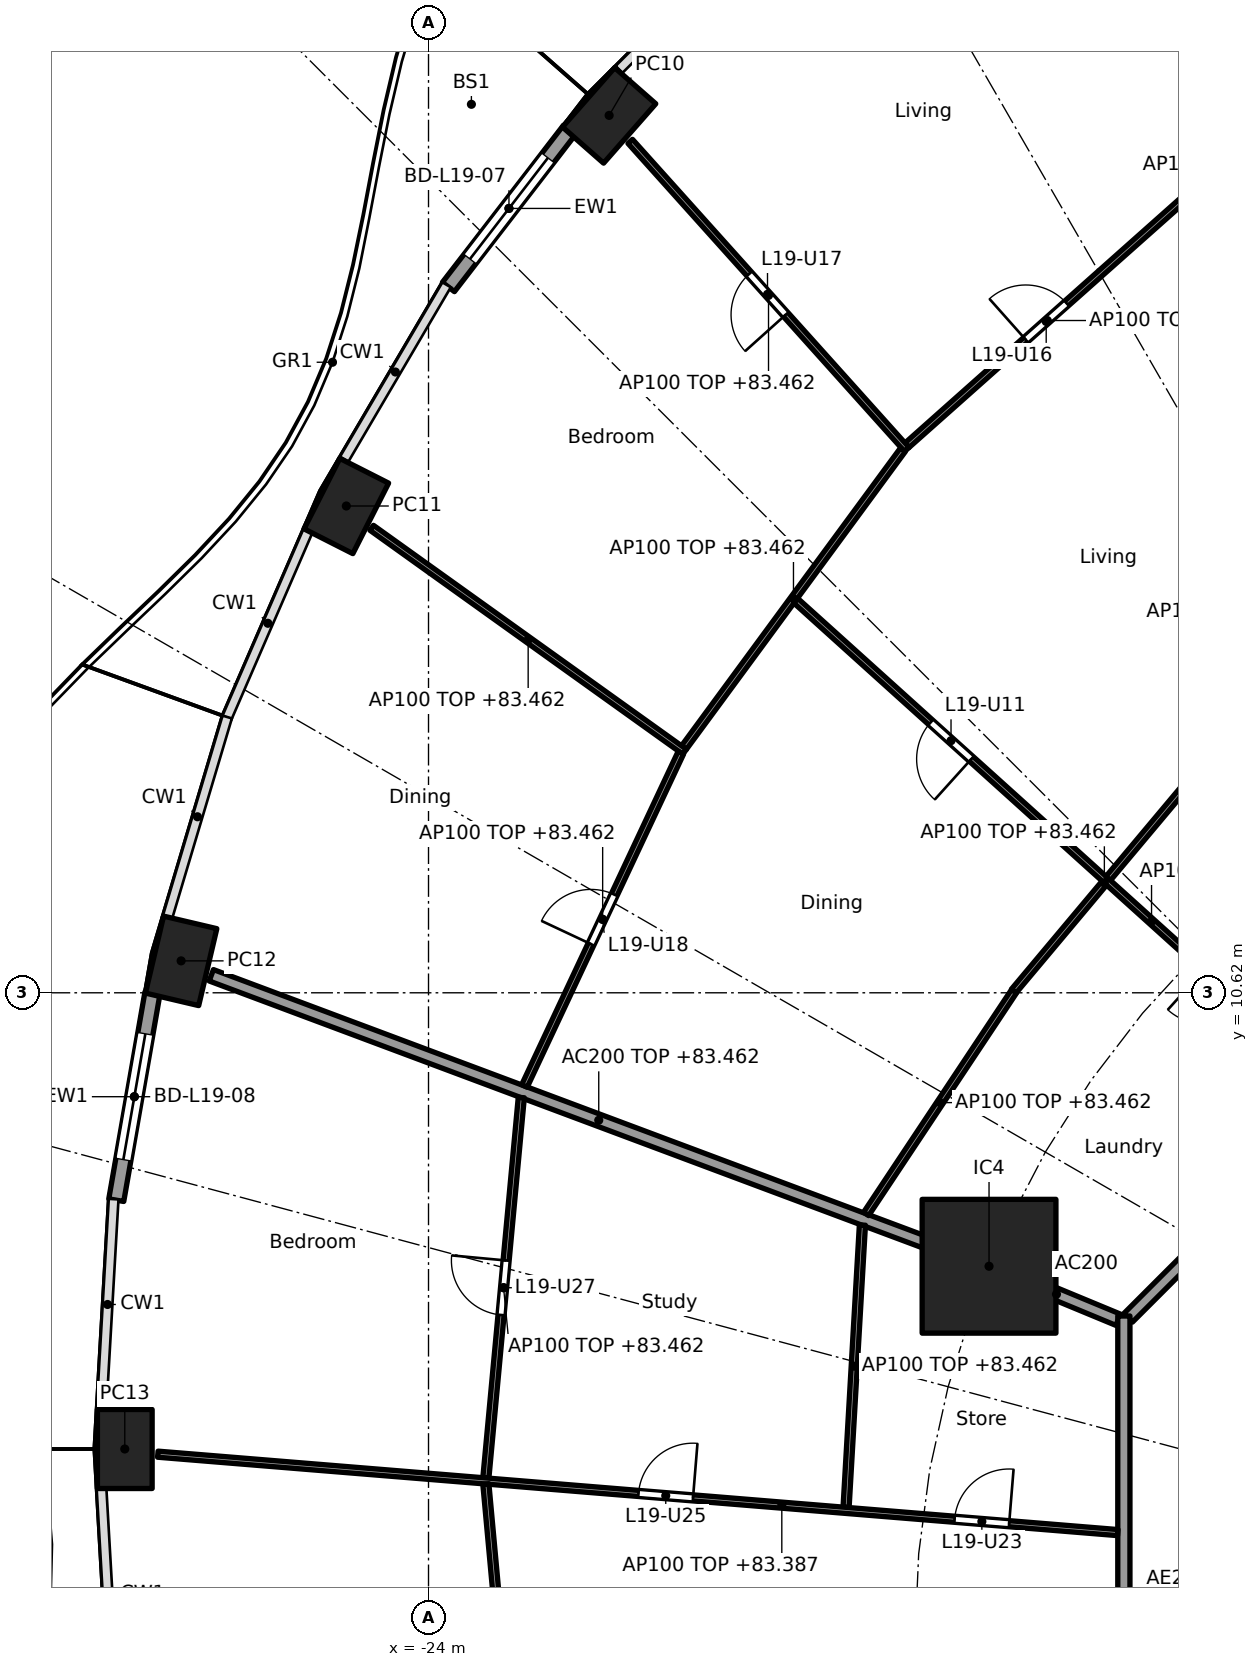
"""IFC4 building model, lengths in metres.
Left out: names, types, materials, properties, quantities, classifications, styles, units other than length and angle.
Written with IfcOpenShell. Run it as: python <this file> out.ifc"""

import sys

from ifc_helpers import new_model, si_unit, direction, frame, frame_2d, origin, origin_2d, place, context, subcontext, project, spatial, rectangle, hollow_rectangle, extrude, element, fill, save


model = new_model("IFC4")
c1 = context("Model", 3, precision=1e-05, world=origin(), true_north=direction((0.0, 1.0)))
c2 = subcontext(c1, "Body", "Model", "MODEL_VIEW")
j1 = project(units=[si_unit("LENGTHUNIT", "METRE"), si_unit("PLANEANGLEUNIT", "RADIAN")], contexts=[c1])
p1 = place(None, origin())
s1 = spatial("IfcSite", under=j1, at=p1, CompositionType="ELEMENT")
p2 = place(p1, origin())
s2 = spatial("IfcBuilding", under=s1, at=p2, CompositionType="ELEMENT")
p3 = place(p2, frame((0.0, 0.0, 80.7)))
s3 = spatial("IfcBuildingStorey", under=s2, at=p3, CompositionType="ELEMENT", Elevation=80.7)
for number, where, z_axis, x_axis in (
    (1, (-21.03, 25.049, 0.0), (0.0, 0.0, 1.0), (-0.66, -0.751, 0.0)),
    (2, (-25.352, 18.625, 0.0), (0.0, 0.0, 1.0), (-0.452, -0.892, 0.0)),
    (3, (-28.068, 11.145, 0.0), (0.0, 0.0, 1.0), (-0.229, -0.973, 0.0)),
    (4, (-28.995, 3.118, 0.0), (0.0, 0.0, 1.0), (0.0, -1.0, 0.0)),
):
    element("IfcColumn", number, at=place(p3, frame(where, z_axis=z_axis, x_axis=x_axis)), inside=s3, PredefinedType="COLUMN", context=c2, shape_type="SweptSolid", body=[
        extrude(hollow_rectangle(XDim=1.3, YDim=0.9, WallThickness=0.045, at=origin_2d()), origin(), (0.0, 0.0, 1.0), 3.7),
    ])
p4 = place(p3, frame((-14.782, 6.123, 0.0), z_axis=(0.0, 0.0, 1.0), x_axis=(1.0, 0.0, 0.0)))
e5 = element("IfcColumn", 5, at=p4, inside=s3, PredefinedType="COLUMN", context=c2, shape_type="SweptSolid", body=[
    extrude(rectangle(XDim=2.2, YDim=2.2, at=origin_2d()), origin(), (0.0, 0.0, 1.0), 3.7),
])
p5 = place(p3, frame((-23.673, 22.227, 0.0), z_axis=(0.0, 0.0, 1.0), x_axis=(0.61041202934, 0.792084057684, 0.0)))
e6 = element("IfcWall", 6, at=p5, inside=s3, PredefinedType="SOLIDWALL", context=c2, shape_type="SweptSolid", body=[
    extrude(rectangle(XDim=3.263, YDim=0.25, at=frame_2d((1.631, 0.0))), origin(), (0.0, 0.0, 1.0), 3.44),
])
p6 = place(p5, frame((0.582, 0.0, 0.0)))
e7 = element("IfcOpeningElement", 7, at=p6, cuts=e6, PredefinedType="OPENING", context=c2, shape_type="SweptSolid", body=[
    extrude(rectangle(XDim=2.1, YDim=2.4, at=frame_2d((1.05, 1.2))), frame((0.0, 0.135, 0.0), z_axis=(0.0, -1.0, 0.0), x_axis=(1.0, 0.0, 0.0)), (0.0, 0.0, 1.0), 0.27),
])
p7 = place(p3, frame((-29.135, 7.21, 0.0), z_axis=(0.0, 0.0, 1.0), x_axis=(0.17223289558, 0.985056257114, 0.0)))
e8 = element("IfcWall", 8, at=p7, inside=s3, PredefinedType="SOLIDWALL", context=c2, shape_type="SweptSolid", body=[
    extrude(rectangle(XDim=3.454, YDim=0.25, at=frame_2d((1.727, 0.0))), origin(), (0.0, 0.0, 1.0), 3.44),
])
p8 = place(p7, frame((0.677, 0.0, 0.0)))
e9 = element("IfcOpeningElement", 9, at=p8, cuts=e8, PredefinedType="OPENING", context=c2, shape_type="SweptSolid", body=[
    extrude(rectangle(XDim=2.1, YDim=2.4, at=frame_2d((1.05, 1.2))), frame((0.0, 0.135, 0.0), z_axis=(0.0, -1.0, 0.0), x_axis=(1.0, 0.0, 0.0)), (0.0, 0.0, 1.0), 0.27),
])
p9 = place(p3, frame((-12.657, 5.243, 0.0), z_axis=(0.0, 0.0, 1.0), x_axis=(-0.923843626288, 0.382770106157, 0.0)))
e10 = element("IfcWall", 10, at=p9, inside=s3, PredefinedType="PARTITIONING", context=c2, shape_type="SweptSolid", body=[
    extrude(rectangle(XDim=2.199, YDim=0.2, at=frame_2d((1.1, 0.0))), origin(), (0.0, 0.0, 1.0), 3.44),
])
p10 = place(p3, frame((-14.829, 6.14, 0.0), z_axis=(0.0, 0.0, 1.0), x_axis=(-0.936597324342, 0.35040755134, 0.0)))
e11 = element("IfcWall", 11, at=p10, inside=s3, PredefinedType="PARTITIONING", context=c2, shape_type="SweptSolid", body=[
    extrude(rectangle(XDim=13.606, YDim=0.2, at=frame_2d((6.803, 0.0))), origin(), (0.0, 0.0, 1.0), 2.762),
])
p11 = place(p3, frame((-5.275, 12.494, 0.0), z_axis=(0.0, 0.0, 1.0), x_axis=(-0.707106781187, -0.707106781187, 0.0)))
e12 = element("IfcWall", 12, at=p11, inside=s3, PredefinedType="PARTITIONING", context=c2, shape_type="SweptSolid", body=[
    extrude(rectangle(XDim=10.209, YDim=0.2, at=frame_2d((5.104, 0.0))), origin(), (0.0, 0.0, 1.0), 3.44),
])
p12 = place(p3, frame((-12.565, 5.304, 0.0), z_axis=(0.0, 0.0, 1.0), x_axis=(0.0, -1.0, 0.0)))
e13 = element("IfcWall", 13, at=p12, inside=s3, PredefinedType="PARTITIONING", context=c2, shape_type="SweptSolid", body=[
    extrude(rectangle(XDim=10.409, YDim=0.2, at=frame_2d((5.205, 0.0))), origin(), (0.0, 0.0, 1.0), 3.44),
])
p13 = place(p12, frame((4.804, 0.0, 0.0)))
e14 = element("IfcOpeningElement", 14, at=p13, cuts=e13, PredefinedType="OPENING", context=c2, shape_type="SweptSolid", body=[
    extrude(rectangle(XDim=1.0, YDim=2.1, at=frame_2d((0.5, 1.05))), frame((0.0, 0.11, 0.0), z_axis=(0.0, -1.0, 0.0), x_axis=(1.0, 0.0, 0.0)), (0.0, 0.0, 1.0), 0.22),
])
p14 = place(p3, frame((-6.072, 17.915, 0.0), z_axis=(0.0, 0.0, 1.0), x_axis=(-0.404139814253, 0.914697223422, 0.0)))
e15 = element("IfcWall", 15, at=p14, inside=s3, PredefinedType="PARTITIONING", context=c2, shape_type="SweptSolid", body=[
    extrude(rectangle(XDim=15.614, YDim=0.1, at=frame_2d((7.807, 0.0))), origin(), (0.0, 0.0, 1.0), 2.837),
])
p15 = place(p14, frame((3.226, 0.0, 0.0)))
e16 = element("IfcOpeningElement", 16, at=p15, cuts=e15, PredefinedType="OPENING", context=c2, shape_type="SweptSolid", body=[
    extrude(rectangle(XDim=0.9, YDim=2.1, at=frame_2d((0.45, 1.05))), frame((0.0, 0.06, 0.0), z_axis=(0.0, -1.0, 0.0), x_axis=(1.0, 0.0, 0.0)), (0.0, 0.0, 1.0), 0.12),
])
p16 = place(p3, frame((-11.516, 23.726, 0.0), z_axis=(0.0, 0.0, 1.0), x_axis=(-0.747428955243, -0.664341747043, 0.0)))
e17 = element("IfcWall", 17, at=p16, inside=s3, PredefinedType="PARTITIONING", context=c2, shape_type="SweptSolid", body=[
    extrude(rectangle(XDim=6.174, YDim=0.1, at=frame_2d((3.087, 0.0))), origin(), (0.0, 0.0, 1.0), 2.762),
])
p17 = place(p16, frame((2.662, 0.0, 0.0)))
e18 = element("IfcOpeningElement", 18, at=p17, cuts=e17, PredefinedType="OPENING", context=c2, shape_type="SweptSolid", body=[
    extrude(rectangle(XDim=0.9, YDim=2.1, at=frame_2d((0.45, 1.05))), frame((0.0, 0.06, 0.0), z_axis=(0.0, -1.0, 0.0), x_axis=(1.0, 0.0, 0.0)), (0.0, 0.0, 1.0), 0.12),
])
p18 = place(p3, frame((-11.396, 14.202, 0.0), z_axis=(0.0, 0.0, 1.0), x_axis=(-0.642475660273, -0.766306091557, 0.0)))
e19 = element("IfcWall", 19, at=p18, inside=s3, PredefinedType="PARTITIONING", context=c2, shape_type="SweptSolid", body=[
    extrude(rectangle(XDim=4.637, YDim=0.1, at=frame_2d((2.319, 0.0))), origin(), (0.0, 0.0, 1.0), 2.762),
])
p19 = place(p3, frame((-16.134, 19.554, 0.0), z_axis=(0.0, 0.0, 1.0), x_axis=(-0.667985610263, 0.74417418961, 0.0)))
e20 = element("IfcWall", 20, at=p19, inside=s3, PredefinedType="PARTITIONING", context=c2, shape_type="SweptSolid", body=[
    extrude(rectangle(XDim=6.809, YDim=0.1, at=frame_2d((3.405, 0.0))), origin(), (0.0, 0.0, 1.0), 2.762),
])
p20 = place(p19, frame((2.98, 0.0, 0.0)))
e21 = element("IfcOpeningElement", 21, at=p20, cuts=e20, PredefinedType="OPENING", context=c2, shape_type="SweptSolid", body=[
    extrude(rectangle(XDim=0.9, YDim=2.1, at=frame_2d((0.45, 1.05))), frame((0.0, 0.06, 0.0), z_axis=(0.0, -1.0, 0.0), x_axis=(1.0, 0.0, 0.0)), (0.0, 0.0, 1.0), 0.12),
])
p21 = place(p3, frame((-16.197, 19.551, 0.0), z_axis=(0.0, 0.0, 1.0), x_axis=(-0.592391983588, -0.80564988536, 0.0)))
e22 = element("IfcWall", 22, at=p21, inside=s3, PredefinedType="PARTITIONING", context=c2, shape_type="SweptSolid", body=[
    extrude(rectangle(XDim=6.08, YDim=0.1, at=frame_2d((3.04, 0.0))), origin(), (0.0, 0.0, 1.0), 2.762),
])
p22 = place(p3, frame((-8.959, 8.952, 0.0), z_axis=(0.0, 0.0, 1.0), x_axis=(-0.742679904999, 0.669646592398, 0.0)))
e23 = element("IfcWall", 23, at=p22, inside=s3, PredefinedType="PARTITIONING", context=c2, shape_type="SweptSolid", body=[
    extrude(rectangle(XDim=12.121, YDim=0.1, at=frame_2d((6.061, 0.0))), origin(), (0.0, 0.0, 1.0), 2.687),
])
p23 = place(p22, frame((2.172, 0.0, 0.0)))
e24 = element("IfcOpeningElement", 24, at=p23, cuts=e23, PredefinedType="OPENING", context=c2, shape_type="SweptSolid", body=[
    extrude(rectangle(XDim=0.9, YDim=2.1, at=frame_2d((0.45, 1.05))), frame((0.0, 0.06, 0.0), z_axis=(0.0, -1.0, 0.0), x_axis=(1.0, 0.0, 0.0)), (0.0, 0.0, 1.0), 0.12),
])
p24 = place(p22, frame((8.233, 0.0, 0.0)))
e25 = element("IfcOpeningElement", 25, at=p24, cuts=e23, PredefinedType="OPENING", context=c2, shape_type="SweptSolid", body=[
    extrude(rectangle(XDim=0.9, YDim=2.1, at=frame_2d((0.45, 1.05))), frame((0.0, 0.06, 0.0), z_axis=(0.0, -1.0, 0.0), x_axis=(1.0, 0.0, 0.0)), (0.0, 0.0, 1.0), 0.12),
])
p25 = place(p3, frame((-14.371, 10.645, 0.0), z_axis=(0.0, 0.0, 1.0), x_axis=(-0.553341009285, -0.832954817168, 0.0)))
e26 = element("IfcWall", 26, at=p25, inside=s3, PredefinedType="PARTITIONING", context=c2, shape_type="SweptSolid", body=[
    extrude(rectangle(XDim=4.396, YDim=0.1, at=frame_2d((2.198, 0.0))), origin(), (0.0, 0.0, 1.0), 2.762),
])
p26 = place(p3, frame((-19.788, 14.583, 0.0), z_axis=(0.0, 0.0, 1.0), x_axis=(-0.813175286569, 0.58201885993, 0.0)))
e27 = element("IfcWall", 27, at=p26, inside=s3, PredefinedType="PARTITIONING", context=c2, shape_type="SweptSolid", body=[
    extrude(rectangle(XDim=6.329, YDim=0.1, at=frame_2d((3.164, 0.0))), origin(), (0.0, 0.0, 1.0), 2.762),
])
p27 = place(p3, frame((-19.85, 14.567, 0.0), z_axis=(0.0, 0.0, 1.0), x_axis=(-0.424942210745, -0.905220480064, 0.0)))
e28 = element("IfcWall", 28, at=p27, inside=s3, PredefinedType="PARTITIONING", context=c2, shape_type="SweptSolid", body=[
    extrude(rectangle(XDim=6.053, YDim=0.1, at=frame_2d((3.027, 0.0))), origin(), (0.0, 0.0, 1.0), 2.762),
])
p28 = place(p27, frame((2.577, 0.0, 0.0)))
e29 = element("IfcOpeningElement", 29, at=p28, cuts=e28, PredefinedType="OPENING", context=c2, shape_type="SweptSolid", body=[
    extrude(rectangle(XDim=0.9, YDim=2.1, at=frame_2d((0.45, 1.05))), frame((0.0, 0.06, 0.0), z_axis=(0.0, -1.0, 0.0), x_axis=(1.0, 0.0, 0.0)), (0.0, 0.0, 1.0), 0.12),
])
p29 = place(p3, frame((-16.865, 6.8, 0.0), z_axis=(0.0, 0.0, 1.0), x_axis=(-0.057758567218, -0.998330580476, 0.0)))
e30 = element("IfcWall", 30, at=p29, inside=s3, PredefinedType="PARTITIONING", context=c2, shape_type="SweptSolid", body=[
    extrude(rectangle(XDim=4.65, YDim=0.1, at=frame_2d((2.325, 0.0))), origin(), (0.0, 0.0, 1.0), 2.762),
])
p30 = place(p3, frame((-22.474, 8.898, 0.0), z_axis=(0.0, 0.0, 1.0), x_axis=(-0.092756864489, -0.995688788774, 0.0)))
e31 = element("IfcWall", 31, at=p30, inside=s3, PredefinedType="PARTITIONING", context=c2, shape_type="SweptSolid", body=[
    extrude(rectangle(XDim=6.283, YDim=0.1, at=frame_2d((3.141, 0.0))), origin(), (0.0, 0.0, 1.0), 2.762),
])
p31 = place(p30, frame((2.691, 0.0, 0.0)))
e32 = element("IfcOpeningElement", 32, at=p31, cuts=e31, PredefinedType="OPENING", context=c2, shape_type="SweptSolid", body=[
    extrude(rectangle(XDim=0.9, YDim=2.1, at=frame_2d((0.45, 1.05))), frame((0.0, 0.06, 0.0), z_axis=(0.0, -1.0, 0.0), x_axis=(1.0, 0.0, 0.0)), (0.0, 0.0, 1.0), 0.12),
])
p32 = place(p3, frame((-12.665, 1.743, 0.0), z_axis=(0.0, 0.0, 1.0), x_axis=(-0.996680482238, 0.081412630013, 0.0)))
e33 = element("IfcWall", 33, at=p32, inside=s3, PredefinedType="PARTITIONING", context=c2, shape_type="SweptSolid", body=[
    extrude(rectangle(XDim=15.84, YDim=0.1, at=frame_2d((7.92, 0.0))), origin(), (0.0, 0.0, 1.0), 2.687),
])
p33 = place(p32, frame((1.793, 0.0, 0.0)))
e34 = element("IfcOpeningElement", 34, at=p33, cuts=e33, PredefinedType="OPENING", context=c2, shape_type="SweptSolid", body=[
    extrude(rectangle(XDim=0.9, YDim=2.1, at=frame_2d((0.45, 1.05))), frame((0.0, 0.06, 0.0), z_axis=(0.0, -1.0, 0.0), x_axis=(1.0, 0.0, 0.0)), (0.0, 0.0, 1.0), 0.12),
])
p34 = place(p32, frame((7.009, 0.0, 0.0)))
e35 = element("IfcOpeningElement", 35, at=p34, cuts=e33, PredefinedType="OPENING", context=c2, shape_type="SweptSolid", body=[
    extrude(rectangle(XDim=0.9, YDim=2.1, at=frame_2d((0.45, 1.05))), frame((0.0, 0.06, 0.0), z_axis=(0.0, -1.0, 0.0), x_axis=(1.0, 0.0, 0.0)), (0.0, 0.0, 1.0), 0.12),
])
p35 = place(p3, frame((-23.057, 2.542, 0.0), z_axis=(0.0, 0.0, 1.0), x_axis=(0.091380945427, -0.995816008514, 0.0)))
e36 = element("IfcWall", 36, at=p35, inside=s3, PredefinedType="PARTITIONING", context=c2, shape_type="SweptSolid", body=[
    extrude(rectangle(XDim=6.302, YDim=0.1, at=frame_2d((3.151, 0.0))), origin(), (0.0, 0.0, 1.0), 2.762),
])
p36 = place(p35, frame((2.701, 0.0, 0.0)))
e37 = element("IfcOpeningElement", 37, at=p36, cuts=e36, PredefinedType="OPENING", context=c2, shape_type="SweptSolid", body=[
    extrude(rectangle(XDim=0.9, YDim=2.1, at=frame_2d((0.45, 1.05))), frame((0.0, 0.06, 0.0), z_axis=(0.0, -1.0, 0.0), x_axis=(1.0, 0.0, 0.0)), (0.0, 0.0, 1.0), 0.12),
])
p37 = place(p6, origin())
e38 = element("IfcDoor", 38, at=p37, inside=s3, OperationType="SLIDING_TO_LEFT", PredefinedType="DOOR", context=c2, shape_type="SweptSolid", body=[
    extrude(rectangle(XDim=2.1, YDim=2.4, at=frame_2d((1.05, 1.2))), frame((0.0, 0.025, 0.0), z_axis=(0.0, -1.0, 0.0), x_axis=(1.0, 0.0, 0.0)), (0.0, 0.0, 1.0), 0.05),
])
fill(e7, e38)
p38 = place(p8, origin())
e39 = element("IfcDoor", 39, at=p38, inside=s3, OperationType="SLIDING_TO_LEFT", PredefinedType="DOOR", context=c2, shape_type="SweptSolid", body=[
    extrude(rectangle(XDim=2.1, YDim=2.4, at=frame_2d((1.05, 1.2))), frame((0.0, 0.025, 0.0), z_axis=(0.0, -1.0, 0.0), x_axis=(1.0, 0.0, 0.0)), (0.0, 0.0, 1.0), 0.05),
])
fill(e9, e39)
p39 = place(p24, origin())
e40 = element("IfcDoor", 40, at=p39, inside=s3, OperationType="SINGLE_SWING_LEFT", PredefinedType="DOOR", context=c2, shape_type="SweptSolid", body=[
    extrude(rectangle(XDim=0.9, YDim=2.1, at=frame_2d((0.45, 1.05))), frame((0.0, 0.025, 0.0), z_axis=(0.0, -1.0, 0.0), x_axis=(1.0, 0.0, 0.0)), (0.0, 0.0, 1.0), 0.05),
])
fill(e25, e40)
p40 = place(p17, frame((0.9, 0.0, 0.0), x_axis=(-1.0, 0.0, 0.0)))
e41 = element("IfcDoor", 41, at=p40, inside=s3, OperationType="SINGLE_SWING_LEFT", PredefinedType="DOOR", context=c2, shape_type="SweptSolid", body=[
    extrude(rectangle(XDim=0.9, YDim=2.1, at=frame_2d((0.45, 1.05))), frame((0.0, 0.025, 0.0), z_axis=(0.0, -1.0, 0.0), x_axis=(1.0, 0.0, 0.0)), (0.0, 0.0, 1.0), 0.05),
])
fill(e18, e41)
p41 = place(p20, origin())
e42 = element("IfcDoor", 42, at=p41, inside=s3, OperationType="SINGLE_SWING_LEFT", PredefinedType="DOOR", context=c2, shape_type="SweptSolid", body=[
    extrude(rectangle(XDim=0.9, YDim=2.1, at=frame_2d((0.45, 1.05))), frame((0.0, 0.025, 0.0), z_axis=(0.0, -1.0, 0.0), x_axis=(1.0, 0.0, 0.0)), (0.0, 0.0, 1.0), 0.05),
])
fill(e21, e42)
p42 = place(p28, frame((0.9, 0.0, 0.0), x_axis=(-1.0, 0.0, 0.0)))
e43 = element("IfcDoor", 43, at=p42, inside=s3, OperationType="SINGLE_SWING_LEFT", PredefinedType="DOOR", context=c2, shape_type="SweptSolid", body=[
    extrude(rectangle(XDim=0.9, YDim=2.1, at=frame_2d((0.45, 1.05))), frame((0.0, 0.025, 0.0), z_axis=(0.0, -1.0, 0.0), x_axis=(1.0, 0.0, 0.0)), (0.0, 0.0, 1.0), 0.05),
])
fill(e29, e43)
p43 = place(p33, frame((0.9, 0.0, 0.0), x_axis=(-1.0, 0.0, 0.0)))
e44 = element("IfcDoor", 44, at=p43, inside=s3, OperationType="SINGLE_SWING_RIGHT", PredefinedType="DOOR", context=c2, shape_type="SweptSolid", body=[
    extrude(rectangle(XDim=0.9, YDim=2.1, at=frame_2d((0.45, 1.05))), frame((0.0, 0.025, 0.0), z_axis=(0.0, -1.0, 0.0), x_axis=(1.0, 0.0, 0.0)), (0.0, 0.0, 1.0), 0.05),
])
fill(e34, e44)
p44 = place(p34, frame((0.9, 0.0, 0.0), x_axis=(-1.0, 0.0, 0.0)))
e45 = element("IfcDoor", 45, at=p44, inside=s3, OperationType="SINGLE_SWING_RIGHT", PredefinedType="DOOR", context=c2, shape_type="SweptSolid", body=[
    extrude(rectangle(XDim=0.9, YDim=2.1, at=frame_2d((0.45, 1.05))), frame((0.0, 0.025, 0.0), z_axis=(0.0, -1.0, 0.0), x_axis=(1.0, 0.0, 0.0)), (0.0, 0.0, 1.0), 0.05),
])
fill(e35, e45)
p45 = place(p31, frame((0.9, 0.0, 0.0), x_axis=(-1.0, 0.0, 0.0)))
e46 = element("IfcDoor", 46, at=p45, inside=s3, OperationType="SINGLE_SWING_RIGHT", PredefinedType="DOOR", context=c2, shape_type="SweptSolid", body=[
    extrude(rectangle(XDim=0.9, YDim=2.1, at=frame_2d((0.45, 1.05))), frame((0.0, 0.025, 0.0), z_axis=(0.0, -1.0, 0.0), x_axis=(1.0, 0.0, 0.0)), (0.0, 0.0, 1.0), 0.05),
])
fill(e32, e46)
save(model, sys.argv[1])
